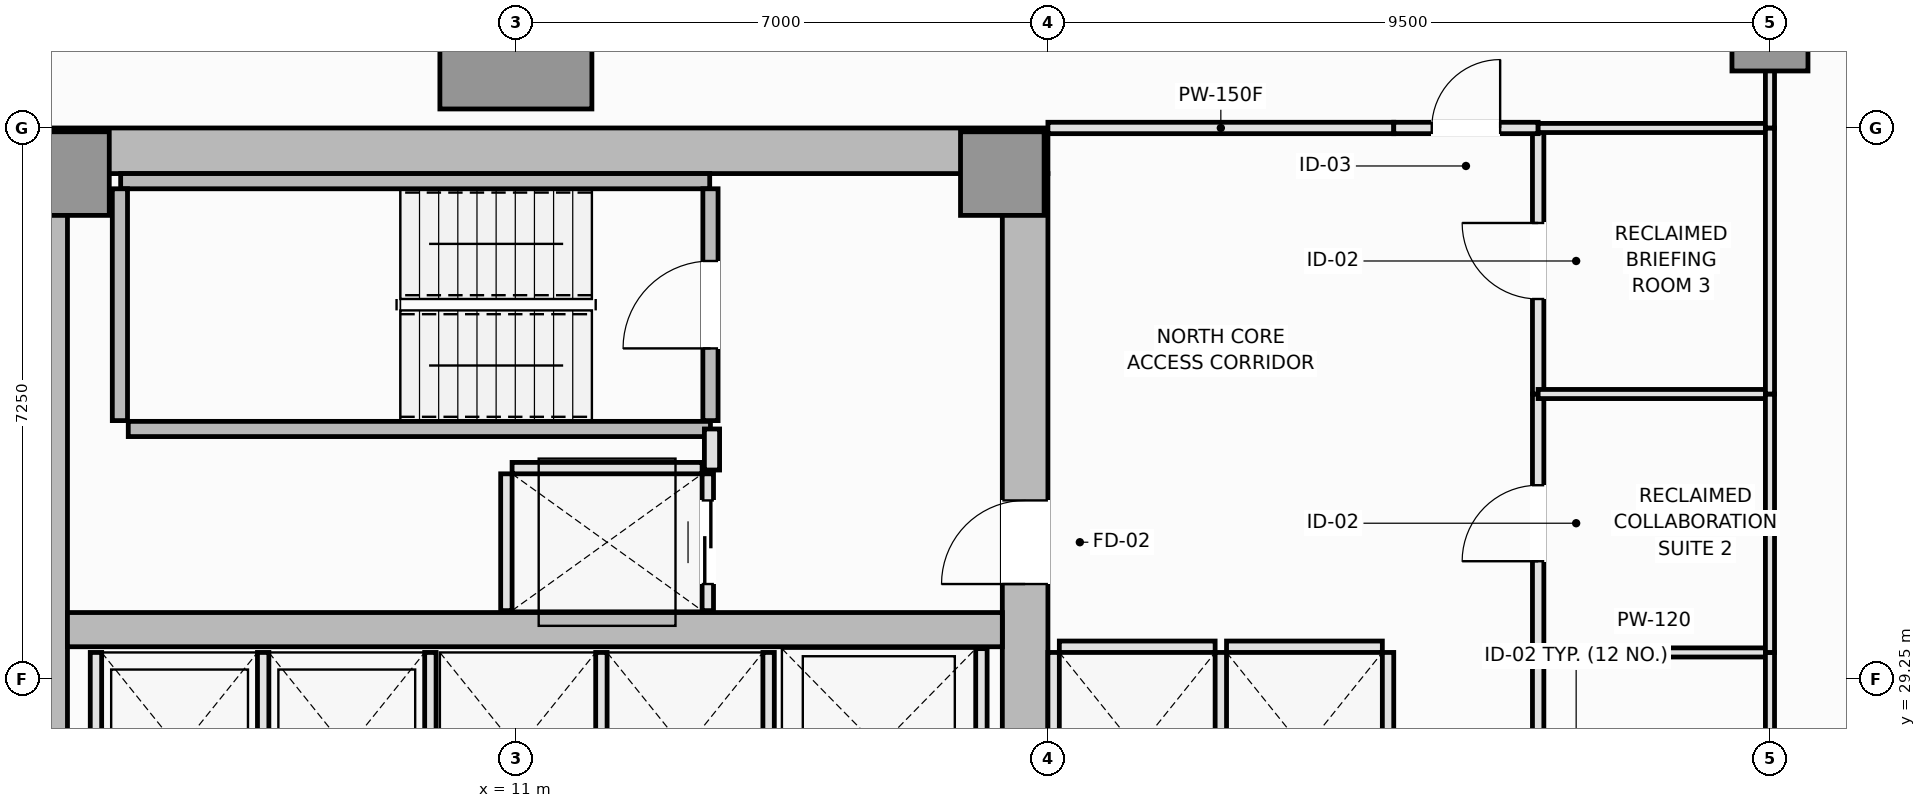
"""IFC4 building model, lengths in metres.
Left out: names, types, materials, properties, quantities, classifications, styles, units other than length and angle.
Written with IfcOpenShell. Run it as: python <this file> out.ifc"""

import sys

from ifc_helpers import new_model, si_unit, direction, frame, frame_2d, origin, origin_2d, place, context, subcontext, project, spatial, rectangle, extrude, element, fill, save


model = new_model("IFC4")
c1 = context("Model", 3, precision=1e-05, world=origin(), true_north=direction((0.0, 1.0)))
c2 = subcontext(c1, "Body", "Model", "MODEL_VIEW")
j1 = project(units=[si_unit("LENGTHUNIT", "METRE"), si_unit("PLANEANGLEUNIT", "RADIAN")], contexts=[c1])
p1 = place(None, origin())
s1 = spatial("IfcSite", under=j1, at=p1, CompositionType="ELEMENT")
p2 = place(p1, origin())
s2 = spatial("IfcBuilding", under=s1, at=p2, CompositionType="ELEMENT")
p3 = place(p2, frame((0.0, 0.0, 102.25)))
s3 = spatial("IfcBuildingStorey", under=s2, at=p3, CompositionType="ELEMENT", Elevation=102.25)
p4 = place(p3, frame((4.5, 36.2, 0.0), z_axis=(0.0, 0.0, 1.0), x_axis=(1.0, 0.0, 0.0)))
e1 = element("IfcWall", 1, at=p4, inside=s3, PredefinedType="SHEAR", context=c2, shape_type="SweptSolid", body=[
    extrude(rectangle(XDim=13.5, YDim=0.6, at=frame_2d((6.75, 0.0))), origin(), (0.0, 0.0, 1.0), 3.55),
])
p5 = place(p3, frame((4.8, 14.6, 0.0), z_axis=(0.0, 0.0, 1.0), x_axis=(0.0, 1.0, 0.0)))
e2 = element("IfcWall", 2, at=p5, inside=s3, PredefinedType="SHEAR", context=c2, shape_type="SweptSolid", body=[
    extrude(rectangle(XDim=21.3, YDim=0.6, at=frame_2d((10.65, 0.0))), origin(), (0.0, 0.0, 1.0), 3.55),
])
p6 = place(p3, frame((17.7, 27.05, 0.0), z_axis=(0.0, 0.0, 1.0), x_axis=(0.0, 1.0, 0.0)))
e3 = element("IfcWall", 3, at=p6, inside=s3, PredefinedType="SHEAR", context=c2, shape_type="SweptSolid", body=[
    extrude(rectangle(XDim=8.85, YDim=0.6, at=frame_2d((4.425, 0.0))), origin(), (0.0, 0.0, 1.0), 3.55),
])
p7 = place(p6, frame((3.45, 0.0, 0.0)))
e4 = element("IfcOpeningElement", 4, at=p7, cuts=e3, PredefinedType="OPENING", context=c2, shape_type="SweptSolid", body=[
    extrude(rectangle(XDim=1.1, YDim=2.15, at=frame_2d((0.55, 1.075))), frame((0.0, 0.31, 0.0), z_axis=(0.0, -1.0, 0.0), x_axis=(1.0, 0.0, 0.0)), (0.0, 0.0, 1.0), 0.62),
])
p8 = place(p3, frame((5.1, 29.9, 0.0), z_axis=(0.0, 0.0, 1.0), x_axis=(1.0, 0.0, 0.0)))
e5 = element("IfcWall", 5, at=p8, inside=s3, PredefinedType="SHEAR", context=c2, shape_type="SweptSolid", body=[
    extrude(rectangle(XDim=12.3, YDim=0.45, at=frame_2d((6.15, 0.0))), origin(), (0.0, 0.0, 1.0), 3.55),
])
for number, where, z_axis, x_axis in (
    (6, (5.1, 35.9, 0.0), (0.0, 0.0, 1.0), (1.0, 0.0, 0.0)),
    (7, (17.4, 35.9, 0.0), (0.0, 0.0, 1.0), (1.0, 0.0, 0.0)),
):
    element("IfcColumn", number, at=place(p3, frame(where, z_axis=z_axis, x_axis=x_axis)), inside=s3, PredefinedType="PILASTER", context=c2, shape_type="SweptSolid", body=[
        extrude(rectangle(XDim=1.1, YDim=1.1, at=origin_2d()), origin(), (0.0, 0.0, 1.0), 3.55),
    ])
p9 = place(p3, frame((11.0, 37.75, 0.0), z_axis=(0.0, 0.0, 1.0), x_axis=(1.0, 0.0, 0.0)))
e8 = element("IfcColumn", 8, at=p9, inside=s3, PredefinedType="COLUMN", context=c2, shape_type="SweptSolid", body=[
    extrude(rectangle(XDim=2.0, YDim=2.0, at=origin_2d()), origin(), (0.0, 0.0, 1.0), 3.55),
])
p10 = place(p3, frame((27.5, 37.75, 0.0), z_axis=(0.0, 0.0, 1.0), x_axis=(1.0, 0.0, 0.0)))
e9 = element("IfcColumn", 9, at=p10, inside=s3, PredefinedType="COLUMN", context=c2, shape_type="SweptSolid", body=[
    extrude(rectangle(XDim=1.0, YDim=1.0, at=origin_2d()), origin(), (0.0, 0.0, 1.0), 3.55),
])
p11 = place(p3, frame((5.8, 35.8, 0.0), z_axis=(0.0, 0.0, 1.0), x_axis=(1.0, 0.0, 0.0)))
e10 = element("IfcWall", 10, at=p11, inside=s3, PredefinedType="SOLIDWALL", context=c2, shape_type="SweptSolid", body=[
    extrude(rectangle(XDim=7.75, YDim=0.2, at=frame_2d((3.875, 0.0))), origin(), (0.0, 0.0, 1.0), 3.55),
])
p12 = place(p3, frame((5.79, 32.65, 0.0), z_axis=(0.0, 0.0, 1.0), x_axis=(0.0, 1.0, 0.0)))
e11 = element("IfcWall", 11, at=p12, inside=s3, PredefinedType="SOLIDWALL", context=c2, shape_type="SweptSolid", body=[
    extrude(rectangle(XDim=3.05, YDim=0.2, at=frame_2d((1.525, 0.0))), origin(), (0.0, 0.0, 1.0), 3.55),
])
p13 = place(p3, frame((5.9, 32.54, 0.0), z_axis=(0.0, 0.0, 1.0), x_axis=(1.0, 0.0, 0.0)))
e12 = element("IfcWall", 12, at=p13, inside=s3, PredefinedType="SOLIDWALL", context=c2, shape_type="SweptSolid", body=[
    extrude(rectangle(XDim=7.66, YDim=0.2, at=frame_2d((3.83, 0.0))), origin(), (0.0, 0.0, 1.0), 3.55),
])
p14 = place(p3, frame((13.56, 32.65, 0.0), z_axis=(0.0, 0.0, 1.0), x_axis=(0.0, 1.0, 0.0)))
e13 = element("IfcWall", 13, at=p14, inside=s3, PredefinedType="SOLIDWALL", context=c2, shape_type="SweptSolid", body=[
    extrude(rectangle(XDim=3.05, YDim=0.2, at=frame_2d((1.525, 0.0))), origin(), (0.0, 0.0, 1.0), 3.55),
])
p15 = place(p14, frame((0.95, 0.0, 0.0)))
e14 = element("IfcOpeningElement", 14, at=p15, cuts=e13, PredefinedType="OPENING", context=c2, shape_type="SweptSolid", body=[
    extrude(rectangle(XDim=1.15, YDim=2.15, at=frame_2d((0.575, 1.075))), frame((0.0, 0.11, 0.0), z_axis=(0.0, -1.0, 0.0), x_axis=(1.0, 0.0, 0.0)), (0.0, 0.0, 1.0), 0.22),
])
p16 = place(p3, frame((18.15, 29.675, 0.0), z_axis=(0.0, 0.0, 1.0), x_axis=(1.0, 0.0, 0.0)))
e15 = element("IfcWall", 15, at=p16, inside=s3, PredefinedType="PARTITIONING", context=c2, shape_type="SweptSolid", body=[
    extrude(rectangle(XDim=2.05, YDim=0.15, at=frame_2d((1.025, 0.0))), origin(), (0.0, 0.0, 1.0), 3.37),
])
for number, where, z_axis, x_axis in (
    (16, (18.075, 27.05, 0.0), (0.0, 0.0, 1.0), (0.0, 1.0, 0.0)),
    (17, (20.275, 27.05, 0.0), (0.0, 0.0, 1.0), (0.0, 1.0, 0.0)),
):
    element("IfcWall", number, at=place(p3, frame(where, z_axis=z_axis, x_axis=x_axis)), inside=s3, PredefinedType="PARTITIONING", context=c2, shape_type="SweptSolid", body=[
        extrude(rectangle(XDim=2.55, YDim=0.15, at=frame_2d((1.275, 0.0))), origin(), (0.0, 0.0, 1.0), 3.37),
    ])
p17 = place(p3, frame((20.35, 29.675, 0.0), z_axis=(0.0, 0.0, 1.0), x_axis=(1.0, 0.0, 0.0)))
e18 = element("IfcWall", 18, at=p17, inside=s3, PredefinedType="PARTITIONING", context=c2, shape_type="SweptSolid", body=[
    extrude(rectangle(XDim=2.05, YDim=0.15, at=frame_2d((1.025, 0.0))), origin(), (0.0, 0.0, 1.0), 3.37),
])
for number, where, z_axis, x_axis in (
    (19, (22.475, 27.05, 0.0), (0.0, 0.0, 1.0), (0.0, 1.0, 0.0)),
    (20, (5.475, 27.05, 0.0), (0.0, 0.0, 1.0), (0.0, 1.0, 0.0)),
    (21, (7.675, 27.05, 0.0), (0.0, 0.0, 1.0), (0.0, 1.0, 0.0)),
    (22, (9.875, 27.05, 0.0), (0.0, 0.0, 1.0), (0.0, 1.0, 0.0)),
    (23, (12.125, 27.05, 0.0), (0.0, 0.0, 1.0), (0.0, 1.0, 0.0)),
    (24, (14.325, 27.05, 0.0), (0.0, 0.0, 1.0), (0.0, 1.0, 0.0)),
):
    element("IfcWall", number, at=place(p3, frame(where, z_axis=z_axis, x_axis=x_axis)), inside=s3, PredefinedType="PARTITIONING", context=c2, shape_type="SweptSolid", body=[
        extrude(rectangle(XDim=2.55, YDim=0.15, at=frame_2d((1.275, 0.0))), origin(), (0.0, 0.0, 1.0), 3.37),
    ])
p18 = place(p3, frame((17.125, 27.05, 0.0), z_axis=(0.0, 0.0, 1.0), x_axis=(0.0, 1.0, 0.0)))
e25 = element("IfcWall", 25, at=p18, inside=s3, PredefinedType="PARTITIONING", context=c2, shape_type="SweptSolid", body=[
    extrude(rectangle(XDim=2.6, YDim=0.15, at=frame_2d((1.3, 0.0))), origin(), (0.0, 0.0, 1.0), 3.37),
])
p19 = place(p3, frame((10.95, 32.025, 0.0), z_axis=(0.0, 0.0, 1.0), x_axis=(1.0, 0.0, 0.0)))
e26 = element("IfcWall", 26, at=p19, inside=s3, PredefinedType="PARTITIONING", context=c2, shape_type="SweptSolid", body=[
    extrude(rectangle(XDim=2.5, YDim=0.15, at=frame_2d((1.25, 0.0))), origin(), (0.0, 0.0, 1.0), 3.37),
])
p20 = place(p3, frame((10.875, 30.15, 0.0), z_axis=(0.0, 0.0, 1.0), x_axis=(0.0, 1.0, 0.0)))
e27 = element("IfcWall", 27, at=p20, inside=s3, PredefinedType="PARTITIONING", context=c2, shape_type="SweptSolid", body=[
    extrude(rectangle(XDim=1.8, YDim=0.15, at=frame_2d((0.9, 0.0))), origin(), (0.0, 0.0, 1.0), 3.37),
])
p21 = place(p3, frame((13.525, 30.15, 0.0), z_axis=(0.0, 0.0, 1.0), x_axis=(0.0, 1.0, 0.0)))
e28 = element("IfcWall", 28, at=p21, inside=s3, PredefinedType="PARTITIONING", context=c2, shape_type="SweptSolid", body=[
    extrude(rectangle(XDim=1.8, YDim=0.15, at=frame_2d((0.9, 0.0))), origin(), (0.0, 0.0, 1.0), 3.37),
])
p22 = place(p21, frame((0.35, 0.0, 0.0)))
e29 = element("IfcOpeningElement", 29, at=p22, cuts=e28, PredefinedType="OPENING", context=c2, shape_type="SweptSolid", body=[
    extrude(rectangle(XDim=1.1, YDim=2.2, at=frame_2d((0.55, 1.1))), frame((0.0, 0.085, 0.0), z_axis=(0.0, -1.0, 0.0), x_axis=(1.0, 0.0, 0.0)), (0.0, 0.0, 1.0), 0.17),
])
p23 = place(p3, frame((13.58, 32.0, 0.0), z_axis=(0.0, 0.0, 1.0), x_axis=(0.0, 1.0, 0.0)))
e30 = element("IfcWall", 30, at=p23, inside=s3, PredefinedType="PARTITIONING", context=c2, shape_type="SweptSolid", body=[
    extrude(rectangle(XDim=0.54, YDim=0.2, at=frame_2d((0.27, 0.0))), origin(), (0.0, 0.0, 1.0), 3.37),
])
p24 = place(p3, frame((18.0, 36.5, 0.0), z_axis=(0.0, 0.0, 1.0), x_axis=(1.0, 0.0, 0.0)))
e31 = element("IfcWall", 31, at=p24, inside=s3, PredefinedType="PARTITIONING", context=c2, shape_type="SweptSolid", body=[
    extrude(rectangle(XDim=4.55, YDim=0.15, at=frame_2d((2.275, 0.0))), origin(), (0.0, 0.0, 1.0), 3.37),
])
p25 = place(p3, frame((24.45, 26.2, 0.0), z_axis=(0.0, 0.0, 1.0), x_axis=(0.0, 1.0, 0.0)))
e32 = element("IfcWall", 32, at=p25, inside=s3, PredefinedType="PARTITIONING", context=c2, shape_type="SweptSolid", body=[
    extrude(rectangle(XDim=3.4, YDim=0.15, at=frame_2d((1.7, 0.0))), origin(), (0.0, 0.0, 1.0), 3.37),
])
p26 = place(p25, frame((1.2, 0.0, 0.0)))
e33 = element("IfcOpeningElement", 33, at=p26, cuts=e32, PredefinedType="OPENING", context=c2, shape_type="SweptSolid", body=[
    extrude(rectangle(XDim=1.0, YDim=2.15, at=frame_2d((0.5, 1.075))), frame((0.0, 0.085, 0.0), z_axis=(0.0, -1.0, 0.0), x_axis=(1.0, 0.0, 0.0)), (0.0, 0.0, 1.0), 0.17),
])
p27 = place(p3, frame((24.45, 29.6, 0.0), z_axis=(0.0, 0.0, 1.0), x_axis=(0.0, 1.0, 0.0)))
e34 = element("IfcWall", 34, at=p27, inside=s3, PredefinedType="PARTITIONING", context=c2, shape_type="SweptSolid", body=[
    extrude(rectangle(XDim=3.4, YDim=0.15, at=frame_2d((1.7, 0.0))), origin(), (0.0, 0.0, 1.0), 3.37),
])
p28 = place(p27, frame((1.2, 0.0, 0.0)))
e35 = element("IfcOpeningElement", 35, at=p28, cuts=e34, PredefinedType="OPENING", context=c2, shape_type="SweptSolid", body=[
    extrude(rectangle(XDim=1.0, YDim=2.15, at=frame_2d((0.5, 1.075))), frame((0.0, 0.085, 0.0), z_axis=(0.0, -1.0, 0.0), x_axis=(1.0, 0.0, 0.0)), (0.0, 0.0, 1.0), 0.17),
])
p29 = place(p3, frame((24.45, 33.0, 0.0), z_axis=(0.0, 0.0, 1.0), x_axis=(0.0, 1.0, 0.0)))
e36 = element("IfcWall", 36, at=p29, inside=s3, PredefinedType="PARTITIONING", context=c2, shape_type="SweptSolid", body=[
    extrude(rectangle(XDim=3.5, YDim=0.15, at=frame_2d((1.75, 0.0))), origin(), (0.0, 0.0, 1.0), 3.37),
])
p30 = place(p29, frame((1.25, 0.0, 0.0)))
e37 = element("IfcOpeningElement", 37, at=p30, cuts=e36, PredefinedType="OPENING", context=c2, shape_type="SweptSolid", body=[
    extrude(rectangle(XDim=1.0, YDim=2.15, at=frame_2d((0.5, 1.075))), frame((0.0, 0.085, 0.0), z_axis=(0.0, -1.0, 0.0), x_axis=(1.0, 0.0, 0.0)), (0.0, 0.0, 1.0), 0.17),
])
p31 = place(p3, frame((22.55, 36.5, 0.0), z_axis=(0.0, 0.0, 1.0), x_axis=(1.0, 0.0, 0.0)))
e38 = element("IfcWall", 38, at=p31, inside=s3, PredefinedType="PARTITIONING", context=c2, shape_type="SweptSolid", body=[
    extrude(rectangle(XDim=1.9, YDim=0.15, at=frame_2d((0.95, 0.0))), origin(), (0.0, 0.0, 1.0), 3.37),
])
p32 = place(p31, frame((0.5, 0.0, 0.0)))
e39 = element("IfcOpeningElement", 39, at=p32, cuts=e38, PredefinedType="OPENING", context=c2, shape_type="SweptSolid", body=[
    extrude(rectangle(XDim=0.9, YDim=2.1, at=frame_2d((0.45, 1.05))), frame((0.0, 0.085, 0.0), z_axis=(0.0, -1.0, 0.0), x_axis=(1.0, 0.0, 0.0)), (0.0, 0.0, 1.0), 0.17),
])
p33 = place(p3, frame((24.45, 29.6, 0.0), z_axis=(0.0, 0.0, 1.0), x_axis=(1.0, 0.0, 0.0)))
e40 = element("IfcWall", 40, at=p33, inside=s3, PredefinedType="PARTITIONING", context=c2, shape_type="SweptSolid", body=[
    extrude(rectangle(XDim=3.05, YDim=0.12, at=frame_2d((1.525, 0.0))), origin(), (0.0, 0.0, 1.0), 3.37),
])
p34 = place(p3, frame((27.5, 26.2, 0.0), z_axis=(0.0, 0.0, 1.0), x_axis=(0.0, 1.0, 0.0)))
e41 = element("IfcWall", 41, at=p34, inside=s3, PredefinedType="PARTITIONING", context=c2, shape_type="SweptSolid", body=[
    extrude(rectangle(XDim=3.4, YDim=0.12, at=frame_2d((1.7, 0.0))), origin(), (0.0, 0.0, 1.0), 3.37),
])
p35 = place(p3, frame((24.45, 33.0, 0.0), z_axis=(0.0, 0.0, 1.0), x_axis=(1.0, 0.0, 0.0)))
e42 = element("IfcWall", 42, at=p35, inside=s3, PredefinedType="PARTITIONING", context=c2, shape_type="SweptSolid", body=[
    extrude(rectangle(XDim=3.05, YDim=0.12, at=frame_2d((1.525, 0.0))), origin(), (0.0, 0.0, 1.0), 3.37),
])
p36 = place(p3, frame((27.5, 29.6, 0.0), z_axis=(0.0, 0.0, 1.0), x_axis=(0.0, 1.0, 0.0)))
e43 = element("IfcWall", 43, at=p36, inside=s3, PredefinedType="PARTITIONING", context=c2, shape_type="SweptSolid", body=[
    extrude(rectangle(XDim=3.4, YDim=0.12, at=frame_2d((1.7, 0.0))), origin(), (0.0, 0.0, 1.0), 3.37),
])
p37 = place(p3, frame((24.45, 36.5, 0.0), z_axis=(0.0, 0.0, 1.0), x_axis=(1.0, 0.0, 0.0)))
e44 = element("IfcWall", 44, at=p37, inside=s3, PredefinedType="PARTITIONING", context=c2, shape_type="SweptSolid", body=[
    extrude(rectangle(XDim=3.05, YDim=0.12, at=frame_2d((1.525, 0.0))), origin(), (0.0, 0.0, 1.0), 3.37),
])
p38 = place(p3, frame((27.5, 33.0, 0.0), z_axis=(0.0, 0.0, 1.0), x_axis=(0.0, 1.0, 0.0)))
e45 = element("IfcWall", 45, at=p38, inside=s3, PredefinedType="PARTITIONING", context=c2, shape_type="SweptSolid", body=[
    extrude(rectangle(XDim=3.5, YDim=0.12, at=frame_2d((1.75, 0.0))), origin(), (0.0, 0.0, 1.0), 3.37),
])
p39 = place(p3, frame((27.5, 36.5, 0.0), z_axis=(0.0, 0.0, 1.0), x_axis=(0.0, 1.0, 0.0)))
e46 = element("IfcWall", 46, at=p39, inside=s3, PredefinedType="PARTITIONING", context=c2, shape_type="SweptSolid", body=[
    extrude(rectangle(XDim=9.99, YDim=0.12, at=frame_2d((4.995, 0.0))), origin(), (0.0, 0.0, 1.0), 2.87),
])
p40 = place(p15, origin())
e47 = element("IfcDoor", 47, at=p40, inside=s3, OperationType="SINGLE_SWING_LEFT", PredefinedType="DOOR", context=c2, shape_type="SweptSolid", body=[
    extrude(rectangle(XDim=1.15, YDim=2.15, at=frame_2d((0.575, 1.075))), frame((0.0, 0.025, 0.0), z_axis=(0.0, -1.0, 0.0), x_axis=(1.0, 0.0, 0.0)), (0.0, 0.0, 1.0), 0.05),
])
fill(e14, e47)
p41 = place(p22, origin())
e48 = element("IfcDoor", 48, at=p41, inside=s3, OperationType="DOUBLE_DOOR_SLIDING", PredefinedType="DOOR", context=c2, shape_type="SweptSolid", body=[
    extrude(rectangle(XDim=1.1, YDim=2.2, at=frame_2d((0.55, 1.1))), frame((0.0, 0.025, 0.0), z_axis=(0.0, -1.0, 0.0), x_axis=(1.0, 0.0, 0.0)), (0.0, 0.0, 1.0), 0.05),
])
fill(e29, e48)
p42 = place(p7, origin())
e49 = element("IfcDoor", 49, at=p42, inside=s3, OperationType="SINGLE_SWING_LEFT", PredefinedType="DOOR", context=c2, shape_type="SweptSolid", body=[
    extrude(rectangle(XDim=1.1, YDim=2.15, at=frame_2d((0.55, 1.075))), frame((0.0, 0.025, 0.0), z_axis=(0.0, -1.0, 0.0), x_axis=(1.0, 0.0, 0.0)), (0.0, 0.0, 1.0), 0.05),
])
fill(e4, e49)
p43 = place(p28, origin())
e50 = element("IfcDoor", 50, at=p43, inside=s3, OperationType="SINGLE_SWING_LEFT", PredefinedType="DOOR", context=c2, shape_type="SweptSolid", body=[
    extrude(rectangle(XDim=1.0, YDim=2.15, at=frame_2d((0.5, 1.075))), frame((0.0, 0.025, 0.0), z_axis=(0.0, -1.0, 0.0), x_axis=(1.0, 0.0, 0.0)), (0.0, 0.0, 1.0), 0.05),
])
fill(e35, e50)
p44 = place(p30, origin())
e51 = element("IfcDoor", 51, at=p44, inside=s3, OperationType="SINGLE_SWING_RIGHT", PredefinedType="DOOR", context=c2, shape_type="SweptSolid", body=[
    extrude(rectangle(XDim=1.0, YDim=2.15, at=frame_2d((0.5, 1.075))), frame((0.0, 0.025, 0.0), z_axis=(0.0, -1.0, 0.0), x_axis=(1.0, 0.0, 0.0)), (0.0, 0.0, 1.0), 0.05),
])
fill(e37, e51)
p45 = place(p32, origin())
e52 = element("IfcDoor", 52, at=p45, inside=s3, OperationType="SINGLE_SWING_RIGHT", PredefinedType="DOOR", context=c2, shape_type="SweptSolid", body=[
    extrude(rectangle(XDim=0.9, YDim=2.1, at=frame_2d((0.45, 1.05))), frame((0.0, 0.025, 0.0), z_axis=(0.0, -1.0, 0.0), x_axis=(1.0, 0.0, 0.0)), (0.0, 0.0, 1.0), 0.05),
])
fill(e39, e52)
save(model, sys.argv[1])
